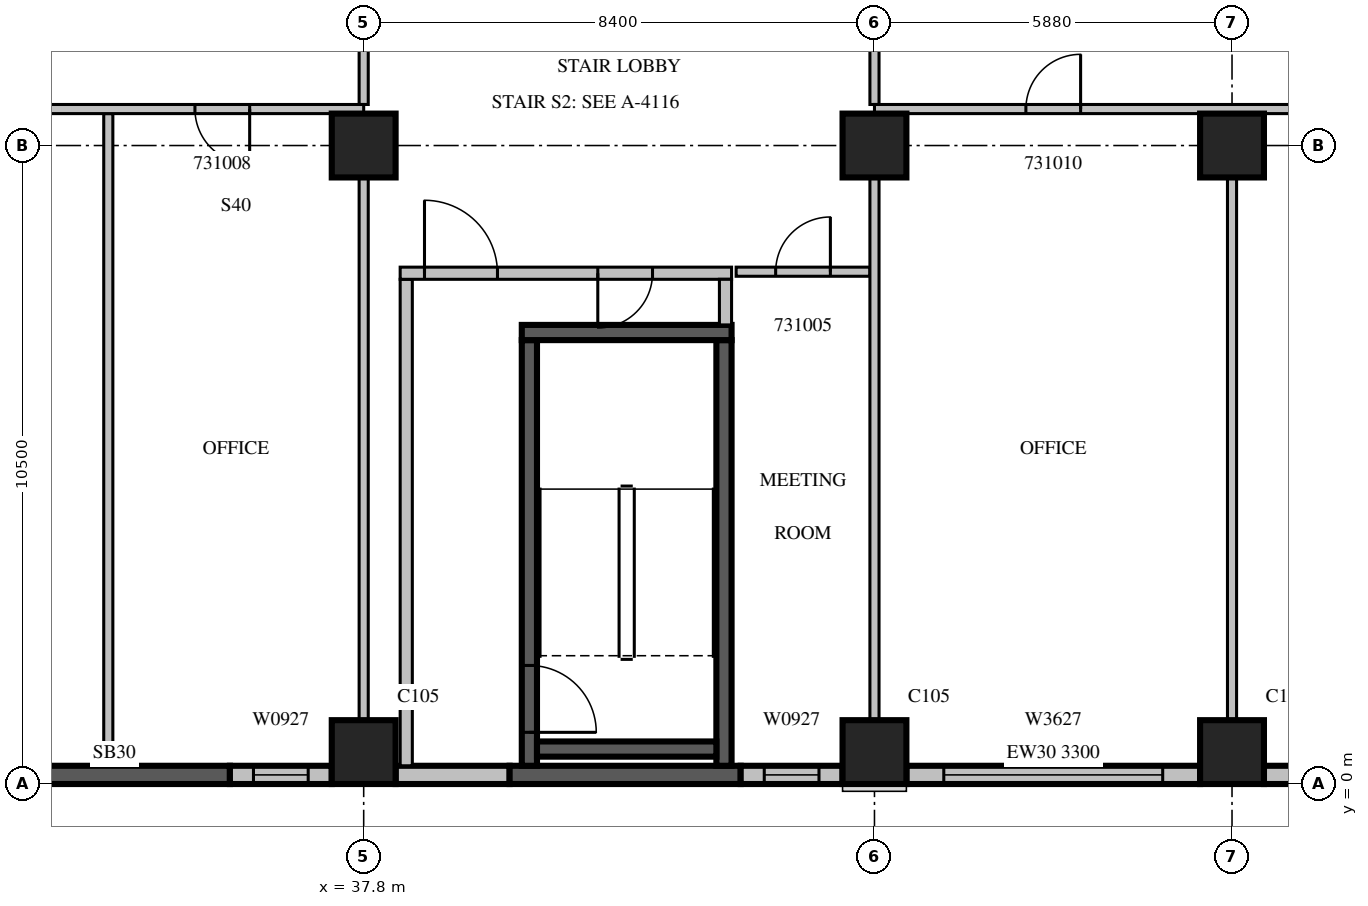
"""IFC4 building model, lengths in metres.
Left out: names, types, materials, properties, quantities, classifications, styles, units other than length and angle.
Written with IfcOpenShell. Run it as: python <this file> out.ifc"""

import sys

from ifc_helpers import new_model, si_unit, direction, frame, frame_2d, origin, origin_2d, place, context, subcontext, project, spatial, rectangle, extrude, source, transform, mapped, element, fill, save


model = new_model("IFC4")
c1 = context("Model", 3, precision=1e-05, world=origin(), true_north=direction((0.0, 1.0)))
c2 = subcontext(c1, "Body", "Model", "MODEL_VIEW")
j1 = project(units=[si_unit("LENGTHUNIT", "METRE"), si_unit("PLANEANGLEUNIT", "RADIAN")], contexts=[c1])
p1 = place(None, origin())
s1 = spatial("IfcSite", under=j1, at=p1, CompositionType="ELEMENT")
p2 = place(p1, origin())
s2 = spatial("IfcBuilding", under=s1, at=p2, CompositionType="ELEMENT")
p3 = place(p2, frame((0.0, 0.0, 141.3)))
s3 = spatial("IfcBuildingStorey", under=s2, at=p3, CompositionType="ELEMENT", Elevation=141.3)
m1 = source(origin(), c2, "Body", "SweptSolid", [
    extrude(rectangle(XDim=1.05, YDim=1.05, at=origin_2d()), origin(), (0.0, 0.0, 1.0), 4.2),
])
for number, where, z_axis, x_axis in (
    (1, (37.8, 0.525, 0.0), (0.0, 0.0, 1.0), (1.0, 0.0, 0.0)),
    (2, (46.2, 0.525, 0.0), (0.0, 0.0, 1.0), (1.0, 0.0, 0.0)),
    (3, (52.08, 0.525, 0.0), (0.0, 0.0, 1.0), (1.0, 0.0, 0.0)),
    (4, (37.8, 10.5, 0.0), (0.0, 0.0, 1.0), (1.0, 0.0, 0.0)),
    (5, (46.2, 10.5, 0.0), (0.0, 0.0, 1.0), (1.0, 0.0, 0.0)),
    (6, (52.08, 10.5, 0.0), (0.0, 0.0, 1.0), (1.0, 0.0, 0.0)),
):
    element("IfcColumn", number, at=place(p3, frame(where, z_axis=z_axis, x_axis=x_axis)), inside=s3, PredefinedType="COLUMN", context=c2, shape_type="MappedRepresentation", body=[
        mapped(m1, transform((0.0, 0.0, 0.0), scale=1.0)),
    ])
m2 = source(origin(), c2, "Body", "SweptSolid", [
    extrude(rectangle(XDim=3.8, YDim=0.3, at=frame_2d((1.9, 0.0))), origin(), (0.0, 0.0, 1.0), 3.8),
])
p4 = place(p3, frame((31.8, 0.15, 0.0), z_axis=(0.0, 0.0, 1.0), x_axis=(1.0, 0.0, 0.0)))
e7 = element("IfcWall", 7, at=p4, inside=s3, PredefinedType="SOLIDWALL", context=c2, shape_type="MappedRepresentation", body=[
    mapped(m2, transform((0.0, 0.0, 0.0), scale=1.0)),
])
m3 = source(origin(), c2, "Body", "SweptSolid", [
    extrude(rectangle(XDim=1.675, YDim=0.3, at=frame_2d((0.838, 0.0))), origin(), (0.0, 0.0, 1.0), 3.8),
])
p5 = place(p3, frame((35.6, 0.15, 0.0), z_axis=(0.0, 0.0, 1.0), x_axis=(1.0, 0.0, 0.0)))
e8 = element("IfcWall", 8, at=p5, inside=s3, PredefinedType="STANDARD", context=c2, shape_type="MappedRepresentation", body=[
    mapped(m3, transform((0.0, 0.0, 0.0), scale=1.0)),
])
m4 = source(origin(), c2, "Body", "SweptSolid", [
    extrude(rectangle(XDim=0.9, YDim=2.7, at=frame_2d((0.45, 1.35))), frame((0.0, 0.16, 0.0), z_axis=(0.0, -1.0, 0.0), x_axis=(1.0, 0.0, 0.0)), (0.0, 0.0, 1.0), 0.32),
])
p6 = place(p5, frame((0.388, 0.0, 0.6)))
e9 = element("IfcOpeningElement", 9, at=p6, cuts=e8, PredefinedType="OPENING", context=c2, shape_type="MappedRepresentation", body=[
    mapped(m4, transform((0.0, 0.0, 0.0), scale=1.0)),
])
m5 = source(origin(), c2, "Body", "SweptSolid", [
    extrude(rectangle(XDim=1.875, YDim=0.3, at=frame_2d((0.938, 0.0))), origin(), (0.0, 0.0, 1.0), 3.8),
])
p7 = place(p3, frame((38.325, 0.15, 0.0), z_axis=(0.0, 0.0, 1.0), x_axis=(1.0, 0.0, 0.0)))
e10 = element("IfcWall", 10, at=p7, inside=s3, PredefinedType="STANDARD", context=c2, shape_type="MappedRepresentation", body=[
    mapped(m5, transform((0.0, 0.0, 0.0), scale=1.0)),
])
p8 = place(p3, frame((40.2, 0.15, 0.0), z_axis=(0.0, 0.0, 1.0), x_axis=(1.0, 0.0, 0.0)))
e11 = element("IfcWall", 11, at=p8, inside=s3, PredefinedType="SOLIDWALL", context=c2, shape_type="MappedRepresentation", body=[
    mapped(m2, transform((0.0, 0.0, 0.0), scale=1.0)),
])
p9 = place(p3, frame((44.0, 0.15, 0.0), z_axis=(0.0, 0.0, 1.0), x_axis=(1.0, 0.0, 0.0)))
e12 = element("IfcWall", 12, at=p9, inside=s3, PredefinedType="STANDARD", context=c2, shape_type="MappedRepresentation", body=[
    mapped(m3, transform((0.0, 0.0, 0.0), scale=1.0)),
])
p10 = place(p9, frame((0.388, 0.0, 0.6)))
e13 = element("IfcOpeningElement", 13, at=p10, cuts=e12, PredefinedType="OPENING", context=c2, shape_type="MappedRepresentation", body=[
    mapped(m4, transform((0.0, 0.0, 0.0), scale=1.0)),
])
m6 = source(origin(), c2, "Body", "SweptSolid", [
    extrude(rectangle(XDim=4.83, YDim=0.3, at=frame_2d((2.415, 0.0))), origin(), (0.0, 0.0, 1.0), 3.3),
])
p11 = place(p3, frame((46.725, 0.15, 0.0), z_axis=(0.0, 0.0, 1.0), x_axis=(1.0, 0.0, 0.0)))
e14 = element("IfcWall", 14, at=p11, inside=s3, PredefinedType="STANDARD", context=c2, shape_type="MappedRepresentation", body=[
    mapped(m6, transform((0.0, 0.0, 0.0), scale=1.0)),
])
m7 = source(origin(), c2, "Body", "SweptSolid", [
    extrude(rectangle(XDim=3.6, YDim=2.7, at=frame_2d((1.8, 1.35))), frame((0.0, 0.16, 0.0), z_axis=(0.0, -1.0, 0.0), x_axis=(1.0, 0.0, 0.0)), (0.0, 0.0, 1.0), 0.32),
])
p12 = place(p11, frame((0.615, 0.0, 0.6)))
e15 = element("IfcOpeningElement", 15, at=p12, cuts=e14, PredefinedType="OPENING", context=c2, shape_type="MappedRepresentation", body=[
    mapped(m7, transform((0.0, 0.0, 0.0), scale=1.0)),
])
m8 = source(origin(), c2, "Body", "SweptSolid", [
    extrude(rectangle(XDim=4.83, YDim=0.3, at=frame_2d((2.415, 0.0))), origin(), (0.0, 0.0, 1.0), 3.8),
])
p13 = place(p3, frame((52.605, 0.15, 0.0), z_axis=(0.0, 0.0, 1.0), x_axis=(1.0, 0.0, 0.0)))
e16 = element("IfcWall", 16, at=p13, inside=s3, PredefinedType="STANDARD", context=c2, shape_type="MappedRepresentation", body=[
    mapped(m8, transform((0.0, 0.0, 0.0), scale=1.0)),
])
p14 = place(p13, frame((0.615, 0.0, 0.6)))
e17 = element("IfcOpeningElement", 17, at=p14, cuts=e16, PredefinedType="OPENING", context=c2, shape_type="MappedRepresentation", body=[
    mapped(m7, transform((0.0, 0.0, 0.0), scale=1.0)),
])
m9 = source(origin(), c2, "Body", "SweptSolid", [
    extrude(rectangle(XDim=7.0, YDim=0.25, at=frame_2d((3.5, 0.0))), origin(), (0.0, 0.0, 1.0), 3.8),
])
p15 = place(p3, frame((40.525, 0.3, 0.0), z_axis=(0.0, 0.0, 1.0), x_axis=(0.0, 1.0, 0.0)))
e18 = element("IfcWall", 18, at=p15, inside=s3, PredefinedType="SOLIDWALL", context=c2, shape_type="MappedRepresentation", body=[
    mapped(m9, transform((0.0, 0.0, 0.0), scale=1.0)),
])
m10 = source(origin(), c2, "Body", "SweptSolid", [
    extrude(rectangle(XDim=1.1, YDim=2.1, at=frame_2d((0.55, 1.05))), frame((0.0, 0.135, 0.0), z_axis=(0.0, -1.0, 0.0), x_axis=(1.0, 0.0, 0.0)), (0.0, 0.0, 1.0), 0.27),
])
p16 = place(p15, frame((0.55, 0.0, 0.0)))
e19 = element("IfcOpeningElement", 19, at=p16, cuts=e18, PredefinedType="OPENING", context=c2, shape_type="MappedRepresentation", body=[
    mapped(m10, transform((0.0, 0.0, 0.0), scale=1.0)),
])
p17 = place(p3, frame((43.725, 0.3, 0.0), z_axis=(0.0, 0.0, 1.0), x_axis=(0.0, 1.0, 0.0)))
e20 = element("IfcWall", 20, at=p17, inside=s3, PredefinedType="SOLIDWALL", context=c2, shape_type="MappedRepresentation", body=[
    mapped(m9, transform((0.0, 0.0, 0.0), scale=1.0)),
])
m11 = source(origin(), c2, "Body", "SweptSolid", [
    extrude(rectangle(XDim=3.45, YDim=0.25, at=frame_2d((1.725, 0.0))), origin(), (0.0, 0.0, 1.0), 3.8),
])
p18 = place(p3, frame((40.4, 7.425, 0.0), z_axis=(0.0, 0.0, 1.0), x_axis=(1.0, 0.0, 0.0)))
e21 = element("IfcWall", 21, at=p18, inside=s3, PredefinedType="SOLIDWALL", context=c2, shape_type="MappedRepresentation", body=[
    mapped(m11, transform((0.0, 0.0, 0.0), scale=1.0)),
])
m12 = source(origin(), c2, "Body", "SweptSolid", [
    extrude(rectangle(XDim=2.95, YDim=0.25, at=frame_2d((1.475, 0.0))), origin(), (0.0, 0.0, 1.0), 3.8),
])
p19 = place(p3, frame((40.65, 0.575, 0.0), z_axis=(0.0, 0.0, 1.0), x_axis=(1.0, 0.0, 0.0)))
e22 = element("IfcWall", 22, at=p19, inside=s3, PredefinedType="SOLIDWALL", context=c2, shape_type="MappedRepresentation", body=[
    mapped(m12, transform((0.0, 0.0, 0.0), scale=1.0)),
])
m13 = source(origin(), c2, "Body", "SweptSolid", [
    extrude(rectangle(XDim=8.0, YDim=0.2, at=frame_2d((4.0, 0.0))), origin(), (0.0, 0.0, 1.0), 3.8),
])
p20 = place(p3, frame((38.5, 0.3, 0.0), z_axis=(0.0, 0.0, 1.0), x_axis=(0.0, 1.0, 0.0)))
e23 = element("IfcWall", 23, at=p20, inside=s3, PredefinedType="PARTITIONING", context=c2, shape_type="MappedRepresentation", body=[
    mapped(m13, transform((0.0, 0.0, 0.0), scale=1.0)),
])
m14 = source(origin(), c2, "Body", "SweptSolid", [
    extrude(rectangle(XDim=5.45, YDim=0.2, at=frame_2d((2.725, 0.0))), origin(), (0.0, 0.0, 1.0), 3.8),
])
p21 = place(p3, frame((38.4, 8.4, 0.0), z_axis=(0.0, 0.0, 1.0), x_axis=(1.0, 0.0, 0.0)))
e24 = element("IfcWall", 24, at=p21, inside=s3, PredefinedType="PARTITIONING", context=c2, shape_type="MappedRepresentation", body=[
    mapped(m14, transform((0.0, 0.0, 0.0), scale=1.0)),
])
m15 = source(origin(), c2, "Body", "SweptSolid", [
    extrude(rectangle(XDim=1.2, YDim=2.1, at=frame_2d((0.6, 1.05))), frame((0.0, 0.11, 0.0), z_axis=(0.0, -1.0, 0.0), x_axis=(1.0, 0.0, 0.0)), (0.0, 0.0, 1.0), 0.22),
])
p22 = place(p21, frame((0.4, 0.0, 0.0)))
e25 = element("IfcOpeningElement", 25, at=p22, cuts=e24, PredefinedType="OPENING", context=c2, shape_type="MappedRepresentation", body=[
    mapped(m15, transform((0.0, 0.0, 0.0), scale=1.0)),
])
m16 = source(origin(), c2, "Body", "SweptSolid", [
    extrude(rectangle(XDim=0.9, YDim=2.1, at=frame_2d((0.45, 1.05))), frame((0.0, 0.11, 0.0), z_axis=(0.0, -1.0, 0.0), x_axis=(1.0, 0.0, 0.0)), (0.0, 0.0, 1.0), 0.22),
])
p23 = place(p21, frame((3.25, 0.0, 0.0)))
e26 = element("IfcOpeningElement", 26, at=p23, cuts=e24, PredefinedType="OPENING", context=c2, shape_type="MappedRepresentation", body=[
    mapped(m16, transform((0.0, 0.0, 0.0), scale=1.0)),
])
m17 = source(origin(), c2, "Body", "SweptSolid", [
    extrude(rectangle(XDim=0.75, YDim=0.2, at=frame_2d((0.375, 0.0))), origin(), (0.0, 0.0, 1.0), 3.8),
])
p24 = place(p3, frame((43.75, 7.55, 0.0), z_axis=(0.0, 0.0, 1.0), x_axis=(0.0, 1.0, 0.0)))
e27 = element("IfcWall", 27, at=p24, inside=s3, PredefinedType="PARTITIONING", context=c2, shape_type="MappedRepresentation", body=[
    mapped(m17, transform((0.0, 0.0, 0.0), scale=1.0)),
])
m18 = source(origin(), c2, "Body", "SweptSolid", [
    extrude(rectangle(XDim=2.2, YDim=0.15, at=frame_2d((1.1, 0.0))), origin(), (0.0, 0.0, 1.0), 3.8),
])
p25 = place(p3, frame((46.125, 8.425, 0.0), z_axis=(0.0, 0.0, 1.0), x_axis=(-1.0, 0.0, 0.0)))
e28 = element("IfcWall", 28, at=p25, inside=s3, PredefinedType="PARTITIONING", context=c2, shape_type="MappedRepresentation", body=[
    mapped(m18, transform((0.0, 0.0, 0.0), scale=1.0)),
])
m19 = source(origin(), c2, "Body", "SweptSolid", [
    extrude(rectangle(XDim=0.9, YDim=2.1, at=frame_2d((0.45, 1.05))), frame((0.0, 0.085, 0.0), z_axis=(0.0, -1.0, 0.0), x_axis=(1.0, 0.0, 0.0)), (0.0, 0.0, 1.0), 0.17),
])
p26 = place(p25, frame((0.65, 0.0, 0.0)))
e29 = element("IfcOpeningElement", 29, at=p26, cuts=e28, PredefinedType="OPENING", context=c2, shape_type="MappedRepresentation", body=[
    mapped(m19, transform((0.0, 0.0, 0.0), scale=1.0)),
])
m20 = source(origin(), c2, "Body", "SweptSolid", [
    extrude(rectangle(XDim=10.725, YDim=0.15, at=frame_2d((5.362, 0.0))), origin(), (0.0, 0.0, 1.0), 3.8),
])
p27 = place(p3, frame((33.6, 0.3, 0.0), z_axis=(0.0, 0.0, 1.0), x_axis=(0.0, 1.0, 0.0)))
e30 = element("IfcWall", 30, at=p27, inside=s3, PredefinedType="PARTITIONING", context=c2, shape_type="MappedRepresentation", body=[
    mapped(m20, transform((0.0, 0.0, 0.0), scale=1.0)),
])
m21 = source(origin(), c2, "Body", "SweptSolid", [
    extrude(rectangle(XDim=8.927, YDim=0.15, at=frame_2d((4.463, 0.0))), origin(), (0.0, 0.0, 1.0), 3.8),
])
p28 = place(p3, frame((37.8, 1.049, 0.0), z_axis=(0.0, 0.0, 1.0), x_axis=(0.0, 1.0, 0.0)))
e31 = element("IfcWall", 31, at=p28, inside=s3, PredefinedType="PARTITIONING", context=c2, shape_type="MappedRepresentation", body=[
    mapped(m21, transform((0.0, 0.0, 0.0), scale=1.0)),
])
m22 = source(origin(), c2, "Body", "SweptSolid", [
    extrude(rectangle(XDim=3.825, YDim=0.15, at=frame_2d((1.913, 0.0))), origin(), (0.0, 0.0, 1.0), 3.8),
])
p29 = place(p3, frame((37.8, 11.175, 0.0), z_axis=(0.0, 0.0, 1.0), x_axis=(0.0, 1.0, 0.0)))
e32 = element("IfcWall", 32, at=p29, inside=s3, PredefinedType="PARTITIONING", context=c2, shape_type="MappedRepresentation", body=[
    mapped(m22, transform((0.0, 0.0, 0.0), scale=1.0)),
])
m23 = source(origin(), c2, "Body", "SweptSolid", [
    extrude(rectangle(XDim=8.4, YDim=0.15, at=frame_2d((4.2, 0.0))), origin(), (0.0, 0.0, 1.0), 3.8),
])
p30 = place(p3, frame((37.8, 11.1, 0.0), z_axis=(0.0, 0.0, 1.0), x_axis=(-1.0, 0.0, 0.0)))
e33 = element("IfcWall", 33, at=p30, inside=s3, PredefinedType="PARTITIONING", context=c2, shape_type="MappedRepresentation", body=[
    mapped(m23, transform((0.0, 0.0, 0.0), scale=1.0)),
])
p31 = place(p30, frame((5.575, 0.0, 0.0)))
e34 = element("IfcOpeningElement", 34, at=p31, cuts=e33, PredefinedType="OPENING", context=c2, shape_type="MappedRepresentation", body=[
    mapped(m19, transform((0.0, 0.0, 0.0), scale=1.0)),
])
p32 = place(p30, frame((1.875, 0.0, 0.0)))
e35 = element("IfcOpeningElement", 35, at=p32, cuts=e33, PredefinedType="OPENING", context=c2, shape_type="MappedRepresentation", body=[
    mapped(m19, transform((0.0, 0.0, 0.0), scale=1.0)),
])
for number, where, z_axis, x_axis in (
    (36, (52.08, 1.049, 0.0), (0.0, 0.0, 1.0), (0.0, 1.0, 0.0)),
    (37, (46.2, 1.049, 0.0), (0.0, 0.0, 1.0), (0.0, 1.0, 0.0)),
):
    element("IfcWall", number, at=place(p3, frame(where, z_axis=z_axis, x_axis=x_axis)), inside=s3, PredefinedType="PARTITIONING", context=c2, shape_type="MappedRepresentation", body=[
        mapped(m21, transform((0.0, 0.0, 0.0), scale=1.0)),
    ])
p33 = place(p3, frame((46.2, 11.175, 0.0), z_axis=(0.0, 0.0, 1.0), x_axis=(0.0, 1.0, 0.0)))
e38 = element("IfcWall", 38, at=p33, inside=s3, PredefinedType="PARTITIONING", context=c2, shape_type="MappedRepresentation", body=[
    mapped(m22, transform((0.0, 0.0, 0.0), scale=1.0)),
])
m24 = source(origin(), c2, "Body", "SweptSolid", [
    extrude(rectangle(XDim=24.9, YDim=0.15, at=frame_2d((12.45, 0.0))), origin(), (0.0, 0.0, 1.0), 3.8),
])
p34 = place(p3, frame((71.1, 11.1, 0.0), z_axis=(0.0, 0.0, 1.0), x_axis=(-1.0, 0.0, 0.0)))
e39 = element("IfcWall", 39, at=p34, inside=s3, PredefinedType="PARTITIONING", context=c2, shape_type="MappedRepresentation", body=[
    mapped(m24, transform((0.0, 0.0, 0.0), scale=1.0)),
])
p35 = place(p34, frame((21.51, 0.0, 0.0)))
e40 = element("IfcOpeningElement", 40, at=p35, cuts=e39, PredefinedType="OPENING", context=c2, shape_type="MappedRepresentation", body=[
    mapped(m19, transform((0.0, 0.0, 0.0), scale=1.0)),
])
p36 = place(p34, frame((15.63, 0.0, 0.0)))
e41 = element("IfcOpeningElement", 41, at=p36, cuts=e39, PredefinedType="OPENING", context=c2, shape_type="MappedRepresentation", body=[
    mapped(m19, transform((0.0, 0.0, 0.0), scale=1.0)),
])
p37 = place(p34, frame((9.75, 0.0, 0.0)))
e42 = element("IfcOpeningElement", 42, at=p37, cuts=e39, PredefinedType="OPENING", context=c2, shape_type="MappedRepresentation", body=[
    mapped(m19, transform((0.0, 0.0, 0.0), scale=1.0)),
])
p38 = place(p34, frame((4.645, 0.0, 0.0)))
e43 = element("IfcOpeningElement", 43, at=p38, cuts=e39, PredefinedType="OPENING", context=c2, shape_type="MappedRepresentation", body=[
    mapped(m19, transform((0.0, 0.0, 0.0), scale=1.0)),
])
p39 = place(p34, frame((2.205, 0.0, 0.0)))
e44 = element("IfcOpeningElement", 44, at=p39, cuts=e39, PredefinedType="OPENING", context=c2, shape_type="MappedRepresentation", body=[
    mapped(m19, transform((0.0, 0.0, 0.0), scale=1.0)),
])
m25 = source(origin(), c2, "Body", "SweptSolid", [
    extrude(rectangle(XDim=0.9, YDim=2.7, at=frame_2d((0.45, 1.35))), frame((0.0, 0.03, 0.0), z_axis=(0.0, -1.0, 0.0), x_axis=(1.0, 0.0, 0.0)), (0.0, 0.0, 1.0), 0.06),
])
p40 = place(p6, origin())
e45 = element("IfcWindow", 45, at=p40, inside=s3, PartitioningType="SINGLE_PANEL", PredefinedType="WINDOW", context=c2, shape_type="MappedRepresentation", body=[
    mapped(m25, transform((0.0, 0.0, 0.0), scale=1.0)),
])
fill(e9, e45)
p41 = place(p10, origin())
e46 = element("IfcWindow", 46, at=p41, inside=s3, PartitioningType="SINGLE_PANEL", PredefinedType="WINDOW", context=c2, shape_type="MappedRepresentation", body=[
    mapped(m25, transform((0.0, 0.0, 0.0), scale=1.0)),
])
fill(e13, e46)
m26 = source(origin(), c2, "Body", "SweptSolid", [
    extrude(rectangle(XDim=3.6, YDim=2.7, at=frame_2d((1.8, 1.35))), frame((0.0, 0.03, 0.0), z_axis=(0.0, -1.0, 0.0), x_axis=(1.0, 0.0, 0.0)), (0.0, 0.0, 1.0), 0.06),
])
p42 = place(p12, origin())
e47 = element("IfcWindow", 47, at=p42, inside=s3, PartitioningType="SINGLE_PANEL", PredefinedType="WINDOW", context=c2, shape_type="MappedRepresentation", body=[
    mapped(m26, transform((0.0, 0.0, 0.0), scale=1.0)),
])
fill(e15, e47)
m27 = source(origin(), c2, "Body", "SweptSolid", [
    extrude(rectangle(XDim=1.1, YDim=2.1, at=frame_2d((0.55, 1.05))), frame((0.0, 0.025, 0.0), z_axis=(0.0, -1.0, 0.0), x_axis=(1.0, 0.0, 0.0)), (0.0, 0.0, 1.0), 0.05),
])
p43 = place(p16, origin())
e48 = element("IfcDoor", 48, at=p43, inside=s3, OperationType="SINGLE_SWING_RIGHT", PredefinedType="DOOR", context=c2, shape_type="MappedRepresentation", body=[
    mapped(m27, transform((0.0, 0.0, 0.0), scale=1.0)),
])
fill(e19, e48)
m28 = source(origin(), c2, "Body", "SweptSolid", [
    extrude(rectangle(XDim=1.2, YDim=2.1, at=frame_2d((0.6, 1.05))), frame((0.0, 0.025, 0.0), z_axis=(0.0, -1.0, 0.0), x_axis=(1.0, 0.0, 0.0)), (0.0, 0.0, 1.0), 0.05),
])
p44 = place(p22, origin())
e49 = element("IfcDoor", 49, at=p44, inside=s3, OperationType="SINGLE_SWING_LEFT", PredefinedType="DOOR", context=c2, shape_type="MappedRepresentation", body=[
    mapped(m28, transform((0.0, 0.0, 0.0), scale=1.0)),
])
fill(e25, e49)
m29 = source(origin(), c2, "Body", "SweptSolid", [
    extrude(rectangle(XDim=0.9, YDim=2.1, at=frame_2d((0.45, 1.05))), frame((0.0, 0.025, 0.0), z_axis=(0.0, -1.0, 0.0), x_axis=(1.0, 0.0, 0.0)), (0.0, 0.0, 1.0), 0.05),
])
p45 = place(p23, origin())
e50 = element("IfcDoor", 50, at=p45, inside=s3, OperationType="SINGLE_SWING_RIGHT", PredefinedType="DOOR", context=c2, shape_type="MappedRepresentation", body=[
    mapped(m29, transform((0.0, 0.0, 0.0), scale=1.0)),
])
fill(e26, e50)
p46 = place(p26, origin())
e51 = element("IfcDoor", 51, at=p46, inside=s3, OperationType="SINGLE_SWING_RIGHT", PredefinedType="DOOR", context=c2, shape_type="MappedRepresentation", body=[
    mapped(m29, transform((0.0, 0.0, 0.0), scale=1.0)),
])
fill(e29, e51)
p47 = place(p32, origin())
e52 = element("IfcDoor", 52, at=p47, inside=s3, OperationType="SINGLE_SWING_LEFT", PredefinedType="DOOR", context=c2, shape_type="MappedRepresentation", body=[
    mapped(m29, transform((0.0, 0.0, 0.0), scale=1.0)),
])
fill(e35, e52)
p48 = place(p35, origin())
e53 = element("IfcDoor", 53, at=p48, inside=s3, OperationType="SINGLE_SWING_RIGHT", PredefinedType="DOOR", context=c2, shape_type="MappedRepresentation", body=[
    mapped(m29, transform((0.0, 0.0, 0.0), scale=1.0)),
])
fill(e40, e53)
save(model, sys.argv[1])
